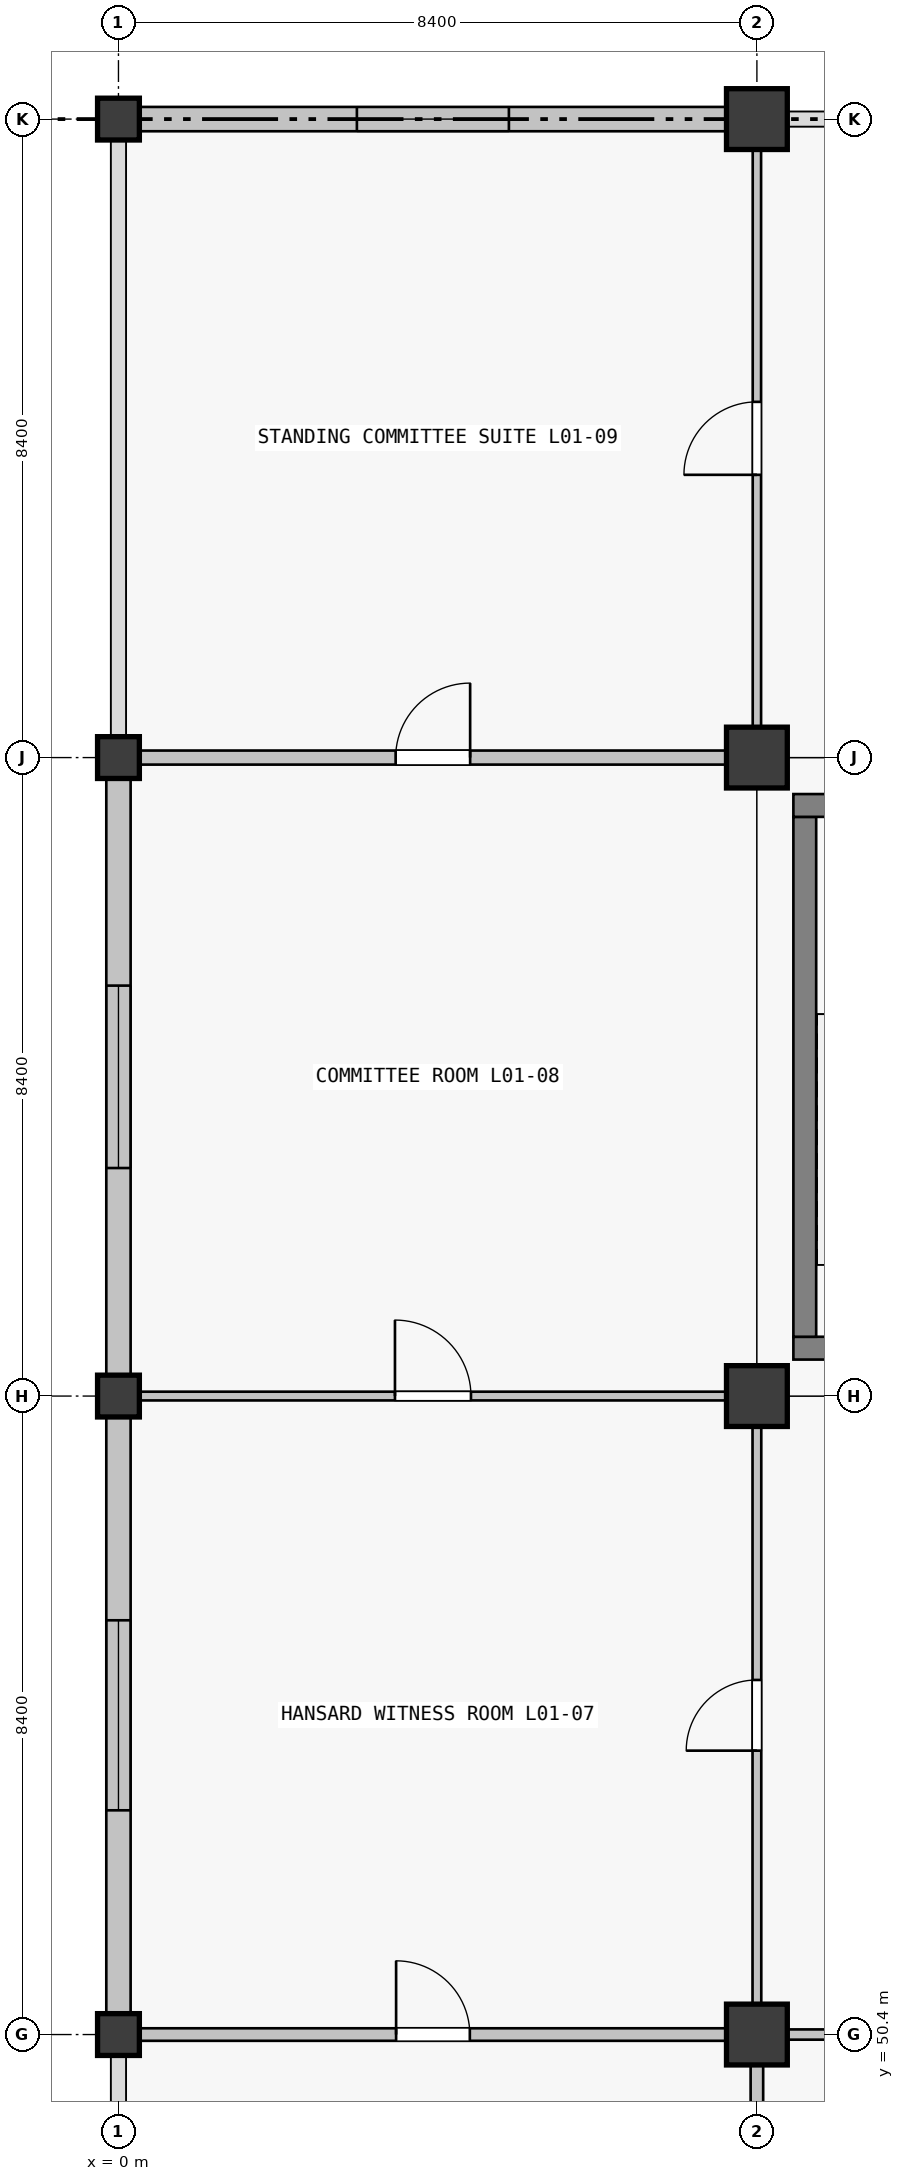
"""IFC4 building model, lengths in metres.
Left out: names, types, materials, properties, quantities, classifications, styles, units other than length and angle.
Written with IfcOpenShell. Run it as: python <this file> out.ifc"""

import sys

from ifc_helpers import new_model, si_unit, direction, frame, frame_2d, origin, origin_2d, place, context, subcontext, project, spatial, rectangle, extrude, element, fill, save


model = new_model("IFC4")
c1 = context("Model", 3, precision=1e-05, world=origin(), true_north=direction((0.0, 1.0)))
c2 = subcontext(c1, "Body", "Model", "MODEL_VIEW")
j1 = project(units=[si_unit("LENGTHUNIT", "METRE"), si_unit("PLANEANGLEUNIT", "RADIAN")], contexts=[c1])
p1 = place(None, origin())
s1 = spatial("IfcSite", under=j1, at=p1, CompositionType="ELEMENT")
p2 = place(p1, origin())
s2 = spatial("IfcBuilding", under=s1, at=p2, CompositionType="ELEMENT")
p3 = place(p2, frame((0.0, 0.0, 5.76)))
s3 = spatial("IfcBuildingStorey", under=s2, at=p3, CompositionType="ELEMENT", Elevation=5.76)
for number, where, z_axis, x_axis in (
    (1, (0.0, 50.4, 0.0), (0.0, 0.0, 1.0), (1.0, 0.0, 0.0)),
    (2, (0.0, 58.8, 0.0), (0.0, 0.0, 1.0), (1.0, 0.0, 0.0)),
    (3, (0.0, 67.2, 0.0), (0.0, 0.0, 1.0), (1.0, 0.0, 0.0)),
    (4, (0.0, 75.6, 0.0), (0.0, 0.0, 1.0), (1.0, 0.0, 0.0)),
):
    element("IfcColumn", number, at=place(p3, frame(where, z_axis=z_axis, x_axis=x_axis)), inside=s3, PredefinedType="COLUMN", context=c2, shape_type="SweptSolid", body=[
        extrude(rectangle(XDim=0.55, YDim=0.55, at=origin_2d()), origin(), (0.0, 0.0, 1.0), 4.2),
    ])
for number, where, z_axis, x_axis in (
    (5, (8.4, 50.4, 0.0), (0.0, 0.0, 1.0), (1.0, 0.0, 0.0)),
    (6, (8.4, 58.8, 0.0), (0.0, 0.0, 1.0), (1.0, 0.0, 0.0)),
    (7, (8.4, 67.2, 0.0), (0.0, 0.0, 1.0), (1.0, 0.0, 0.0)),
    (8, (8.4, 75.6, 0.0), (0.0, 0.0, 1.0), (1.0, 0.0, 0.0)),
):
    element("IfcColumn", number, at=place(p3, frame(where, z_axis=z_axis, x_axis=x_axis)), inside=s3, PredefinedType="COLUMN", context=c2, shape_type="SweptSolid", body=[
        extrude(rectangle(XDim=0.8, YDim=0.8, at=origin_2d()), origin(), (0.0, 0.0, 1.0), 4.5),
    ])
p4 = place(p3, frame((0.0, 50.676, 0.0), z_axis=(0.0, 0.0, 1.0), x_axis=(0.0, 1.0, 0.0)))
e9 = element("IfcWall", 9, at=p4, inside=s3, PredefinedType="SOLIDWALL", context=c2, shape_type="SweptSolid", body=[
    extrude(rectangle(XDim=7.848, YDim=0.32, at=frame_2d((3.924, 0.0))), origin(), (0.0, 0.0, 1.0), 3.4),
])
p5 = place(p4, frame((2.674, 0.0, 0.9)))
e10 = element("IfcOpeningElement", 10, at=p5, cuts=e9, PredefinedType="OPENING", context=c2, shape_type="SweptSolid", body=[
    extrude(rectangle(XDim=2.5, YDim=1.65, at=frame_2d((1.25, 0.825))), frame((0.0, 0.16, 0.0), z_axis=(0.0, -1.0, 0.0), x_axis=(1.0, 0.0, 0.0)), (0.0, 0.0, 1.0), 0.32),
])
p6 = place(p3, frame((0.0, 59.076, 0.0), z_axis=(0.0, 0.0, 1.0), x_axis=(0.0, 1.0, 0.0)))
e11 = element("IfcWall", 11, at=p6, inside=s3, PredefinedType="SOLIDWALL", context=c2, shape_type="SweptSolid", body=[
    extrude(rectangle(XDim=7.848, YDim=0.32, at=frame_2d((3.924, 0.0))), origin(), (0.0, 0.0, 1.0), 3.4),
])
p7 = place(p6, frame((2.724, 0.0, 0.9)))
e12 = element("IfcOpeningElement", 12, at=p7, cuts=e11, PredefinedType="OPENING", context=c2, shape_type="SweptSolid", body=[
    extrude(rectangle(XDim=2.4, YDim=2.25, at=frame_2d((1.2, 1.125))), frame((0.0, 0.16, 0.0), z_axis=(0.0, -1.0, 0.0), x_axis=(1.0, 0.0, 0.0)), (0.0, 0.0, 1.0), 0.32),
])
p8 = place(p3, frame((0.276, 75.6, 0.0), z_axis=(0.0, 0.0, 1.0), x_axis=(1.0, 0.0, 0.0)))
e13 = element("IfcWall", 13, at=p8, inside=s3, PredefinedType="SOLIDWALL", context=c2, shape_type="SweptSolid", body=[
    extrude(rectangle(XDim=7.723, YDim=0.32, at=frame_2d((3.862, 0.0))), origin(), (0.0, 0.0, 1.0), 3.4),
])
p9 = place(p8, frame((2.861, 0.0, 0.9)))
e14 = element("IfcOpeningElement", 14, at=p9, cuts=e13, PredefinedType="OPENING", context=c2, shape_type="SweptSolid", body=[
    extrude(rectangle(XDim=2.0, YDim=2.25, at=frame_2d((1.0, 1.125))), frame((0.0, 0.16, 0.0), z_axis=(0.0, -1.0, 0.0), x_axis=(1.0, 0.0, 0.0)), (0.0, 0.0, 1.0), 0.32),
])
p10 = place(p3, frame((16.32, 59.43, 0.0), z_axis=(0.0, 0.0, 1.0), x_axis=(-1.0, 0.0, 0.0)))
e15 = element("IfcWall", 15, at=p10, inside=s3, PredefinedType="SHEAR", context=c2, shape_type="SweptSolid", body=[
    extrude(rectangle(XDim=7.44, YDim=0.3, at=frame_2d((3.72, 0.0))), origin(), (0.0, 0.0, 1.0), 4.5),
])
p11 = place(p10, frame((1.28, 0.0, 0.0)))
e16 = element("IfcOpeningElement", 16, at=p11, cuts=e15, PredefinedType="OPENING", context=c2, shape_type="SweptSolid", body=[
    extrude(rectangle(XDim=1.5, YDim=2.15, at=frame_2d((0.75, 1.075))), frame((0.0, 0.15, 0.0), z_axis=(0.0, -1.0, 0.0), x_axis=(1.0, 0.0, 0.0)), (0.0, 0.0, 1.0), 0.3),
])
p12 = place(p3, frame((9.03, 59.58, 0.0), z_axis=(0.0, 0.0, 1.0), x_axis=(0.0, 1.0, 0.0)))
e17 = element("IfcWall", 17, at=p12, inside=s3, PredefinedType="SHEAR", context=c2, shape_type="SweptSolid", body=[
    extrude(rectangle(XDim=6.84, YDim=0.3, at=frame_2d((3.42, 0.0))), origin(), (0.0, 0.0, 1.0), 4.5),
])
p13 = place(p3, frame((8.88, 66.57, 0.0), z_axis=(0.0, 0.0, 1.0), x_axis=(1.0, 0.0, 0.0)))
e18 = element("IfcWall", 18, at=p13, inside=s3, PredefinedType="SHEAR", context=c2, shape_type="SweptSolid", body=[
    extrude(rectangle(XDim=7.44, YDim=0.3, at=frame_2d((3.72, 0.0))), origin(), (0.0, 0.0, 1.0), 4.5),
])
p14 = place(p3, frame((0.277, 50.4, 0.0), z_axis=(0.0, 0.0, 1.0), x_axis=(1.0, 0.0, 0.0)))
e19 = element("IfcWall", 19, at=p14, inside=s3, PredefinedType="PARTITIONING", context=c2, shape_type="SweptSolid", body=[
    extrude(rectangle(XDim=7.721, YDim=0.165, at=frame_2d((3.86, 0.0))), origin(), (0.0, 0.0, 1.0), 2.4),
])
p15 = place(p14, frame((3.376, 0.0, 0.0)))
e20 = element("IfcOpeningElement", 20, at=p15, cuts=e19, PredefinedType="OPENING", context=c2, shape_type="SweptSolid", body=[
    extrude(rectangle(XDim=0.97, YDim=2.12, at=frame_2d((0.485, 1.06))), frame((0.0, 0.083, 0.0), z_axis=(0.0, -1.0, 0.0), x_axis=(1.0, 0.0, 0.0)), (0.0, 0.0, 1.0), 0.165),
])
p16 = place(p3, frame((0.277, 58.8, 0.0), z_axis=(0.0, 0.0, 1.0), x_axis=(1.0, 0.0, 0.0)))
e21 = element("IfcWall", 21, at=p16, inside=s3, PredefinedType="PARTITIONING", context=c2, shape_type="SweptSolid", body=[
    extrude(rectangle(XDim=7.721, YDim=0.115, at=frame_2d((3.86, 0.0))), origin(), (0.0, 0.0, 1.0), 2.4),
])
p17 = place(p16, frame((3.361, 0.0, 0.0)))
e22 = element("IfcOpeningElement", 22, at=p17, cuts=e21, PredefinedType="OPENING", context=c2, shape_type="SweptSolid", body=[
    extrude(rectangle(XDim=1.0, YDim=2.2, at=frame_2d((0.5, 1.1))), frame((0.0, 0.058, 0.0), z_axis=(0.0, -1.0, 0.0), x_axis=(1.0, 0.0, 0.0)), (0.0, 0.0, 1.0), 0.115),
])
p18 = place(p3, frame((0.277, 67.2, 0.0), z_axis=(0.0, 0.0, 1.0), x_axis=(1.0, 0.0, 0.0)))
e23 = element("IfcWall", 23, at=p18, inside=s3, PredefinedType="PARTITIONING", context=c2, shape_type="SweptSolid", body=[
    extrude(rectangle(XDim=7.721, YDim=0.185, at=frame_2d((3.86, 0.0))), origin(), (0.0, 0.0, 1.0), 2.4),
])
p19 = place(p18, frame((3.37, 0.0, 0.0)))
e24 = element("IfcOpeningElement", 24, at=p19, cuts=e23, PredefinedType="OPENING", context=c2, shape_type="SweptSolid", body=[
    extrude(rectangle(XDim=0.98, YDim=2.18, at=frame_2d((0.49, 1.09))), frame((0.0, 0.093, 0.0), z_axis=(0.0, -1.0, 0.0), x_axis=(1.0, 0.0, 0.0)), (0.0, 0.0, 1.0), 0.185),
])
p20 = place(p3, frame((8.802, 50.4, 0.0), z_axis=(0.0, 0.0, 1.0), x_axis=(1.0, 0.0, 0.0)))
e25 = element("IfcWall", 25, at=p20, inside=s3, PredefinedType="PARTITIONING", context=c2, shape_type="SweptSolid", body=[
    extrude(rectangle(XDim=7.596, YDim=0.135, at=frame_2d((3.798, 0.0))), origin(), (0.0, 0.0, 1.0), 2.4),
])
p21 = place(p20, frame((3.328, 0.0, 0.0)))
e26 = element("IfcOpeningElement", 26, at=p21, cuts=e25, PredefinedType="OPENING", context=c2, shape_type="SweptSolid", body=[
    extrude(rectangle(XDim=0.94, YDim=2.15, at=frame_2d((0.47, 1.075))), frame((0.0, 0.067, 0.0), z_axis=(0.0, -1.0, 0.0), x_axis=(1.0, 0.0, 0.0)), (0.0, 0.0, 1.0), 0.135),
])
p22 = place(p3, frame((8.4, 42.402, 0.0), z_axis=(0.0, 0.0, 1.0), x_axis=(0.0, 1.0, 0.0)))
e27 = element("IfcWall", 27, at=p22, inside=s3, PredefinedType="PARTITIONING", context=c2, shape_type="SweptSolid", body=[
    extrude(rectangle(XDim=7.596, YDim=0.165, at=frame_2d((3.798, 0.0))), origin(), (0.0, 0.0, 1.0), 2.4),
])
p23 = place(p22, frame((3.318, 0.0, 0.0)))
e28 = element("IfcOpeningElement", 28, at=p23, cuts=e27, PredefinedType="OPENING", context=c2, shape_type="SweptSolid", body=[
    extrude(rectangle(XDim=0.96, YDim=2.18, at=frame_2d((0.48, 1.09))), frame((0.0, 0.083, 0.0), z_axis=(0.0, -1.0, 0.0), x_axis=(1.0, 0.0, 0.0)), (0.0, 0.0, 1.0), 0.165),
])
p24 = place(p3, frame((8.4, 50.802, 0.0), z_axis=(0.0, 0.0, 1.0), x_axis=(0.0, 1.0, 0.0)))
e29 = element("IfcWall", 29, at=p24, inside=s3, PredefinedType="PARTITIONING", context=c2, shape_type="SweptSolid", body=[
    extrude(rectangle(XDim=7.596, YDim=0.115, at=frame_2d((3.798, 0.0))), origin(), (0.0, 0.0, 1.0), 2.4),
])
p25 = place(p24, frame((3.333, 0.0, 0.0)))
e30 = element("IfcOpeningElement", 30, at=p25, cuts=e29, PredefinedType="OPENING", context=c2, shape_type="SweptSolid", body=[
    extrude(rectangle(XDim=0.93, YDim=2.12, at=frame_2d((0.465, 1.06))), frame((0.0, 0.058, 0.0), z_axis=(0.0, -1.0, 0.0), x_axis=(1.0, 0.0, 0.0)), (0.0, 0.0, 1.0), 0.115),
])
p26 = place(p3, frame((8.4, 67.602, 0.0), z_axis=(0.0, 0.0, 1.0), x_axis=(0.0, 1.0, 0.0)))
e31 = element("IfcWall", 31, at=p26, inside=s3, PredefinedType="MOVABLE", context=c2, shape_type="SweptSolid", body=[
    extrude(rectangle(XDim=7.596, YDim=0.11, at=frame_2d((3.798, 0.0))), origin(), (0.0, 0.0, 1.0), 2.4),
])
p27 = place(p26, frame((3.318, 0.0, 0.0)))
e32 = element("IfcOpeningElement", 32, at=p27, cuts=e31, PredefinedType="OPENING", context=c2, shape_type="SweptSolid", body=[
    extrude(rectangle(XDim=0.96, YDim=2.18, at=frame_2d((0.48, 1.09))), frame((0.0, 0.055, 0.0), z_axis=(0.0, -1.0, 0.0), x_axis=(1.0, 0.0, 0.0)), (0.0, 0.0, 1.0), 0.11),
])
p28 = place(p5, origin())
e33 = element("IfcWindow", 33, at=p28, inside=s3, PartitioningType="SINGLE_PANEL", PredefinedType="WINDOW", context=c2, shape_type="SweptSolid", body=[
    extrude(rectangle(XDim=2.5, YDim=1.65, at=frame_2d((1.25, 0.825))), frame((0.0, 0.03, 0.0), z_axis=(0.0, -1.0, 0.0), x_axis=(1.0, 0.0, 0.0)), (0.0, 0.0, 1.0), 0.06),
])
fill(e10, e33)
p29 = place(p7, origin())
e34 = element("IfcWindow", 34, at=p29, inside=s3, PartitioningType="SINGLE_PANEL", PredefinedType="WINDOW", context=c2, shape_type="SweptSolid", body=[
    extrude(rectangle(XDim=2.4, YDim=2.25, at=frame_2d((1.2, 1.125))), frame((0.0, 0.03, 0.0), z_axis=(0.0, -1.0, 0.0), x_axis=(1.0, 0.0, 0.0)), (0.0, 0.0, 1.0), 0.06),
])
fill(e12, e34)
p30 = place(p9, origin())
e35 = element("IfcWindow", 35, at=p30, inside=s3, PartitioningType="SINGLE_PANEL", PredefinedType="WINDOW", context=c2, shape_type="SweptSolid", body=[
    extrude(rectangle(XDim=2.0, YDim=2.25, at=frame_2d((1.0, 1.125))), frame((0.0, 0.03, 0.0), z_axis=(0.0, -1.0, 0.0), x_axis=(1.0, 0.0, 0.0)), (0.0, 0.0, 1.0), 0.06),
])
fill(e14, e35)
p31 = place(p25, origin())
e36 = element("IfcDoor", 36, at=p31, inside=s3, OperationType="SINGLE_SWING_LEFT", PredefinedType="DOOR", context=c2, shape_type="SweptSolid", body=[
    extrude(rectangle(XDim=0.93, YDim=2.12, at=frame_2d((0.465, 1.06))), frame((0.0, 0.025, 0.0), z_axis=(0.0, -1.0, 0.0), x_axis=(1.0, 0.0, 0.0)), (0.0, 0.0, 1.0), 0.05),
])
fill(e30, e36)
p32 = place(p17, origin())
e37 = element("IfcDoor", 37, at=p32, inside=s3, OperationType="SINGLE_SWING_LEFT", PredefinedType="DOOR", context=c2, shape_type="SweptSolid", body=[
    extrude(rectangle(XDim=1.0, YDim=2.2, at=frame_2d((0.5, 1.1))), frame((0.0, 0.025, 0.0), z_axis=(0.0, -1.0, 0.0), x_axis=(1.0, 0.0, 0.0)), (0.0, 0.0, 1.0), 0.05),
])
fill(e22, e37)
p33 = place(p19, origin())
e38 = element("IfcDoor", 38, at=p33, inside=s3, OperationType="SINGLE_SWING_RIGHT", PredefinedType="DOOR", context=c2, shape_type="SweptSolid", body=[
    extrude(rectangle(XDim=0.98, YDim=2.18, at=frame_2d((0.49, 1.09))), frame((0.0, 0.025, 0.0), z_axis=(0.0, -1.0, 0.0), x_axis=(1.0, 0.0, 0.0)), (0.0, 0.0, 1.0), 0.05),
])
fill(e24, e38)
p34 = place(p27, origin())
e39 = element("IfcDoor", 39, at=p34, inside=s3, OperationType="SINGLE_SWING_LEFT", PredefinedType="DOOR", context=c2, shape_type="SweptSolid", body=[
    extrude(rectangle(XDim=0.96, YDim=2.18, at=frame_2d((0.48, 1.09))), frame((0.0, 0.025, 0.0), z_axis=(0.0, -1.0, 0.0), x_axis=(1.0, 0.0, 0.0)), (0.0, 0.0, 1.0), 0.05),
])
fill(e32, e39)
p35 = place(p15, origin())
e40 = element("IfcDoor", 40, at=p35, inside=s3, OperationType="SINGLE_SWING_LEFT", PredefinedType="DOOR", context=c2, shape_type="SweptSolid", body=[
    extrude(rectangle(XDim=0.97, YDim=2.12, at=frame_2d((0.485, 1.06))), frame((0.0, 0.025, 0.0), z_axis=(0.0, -1.0, 0.0), x_axis=(1.0, 0.0, 0.0)), (0.0, 0.0, 1.0), 0.05),
])
fill(e20, e40)
save(model, sys.argv[1])
